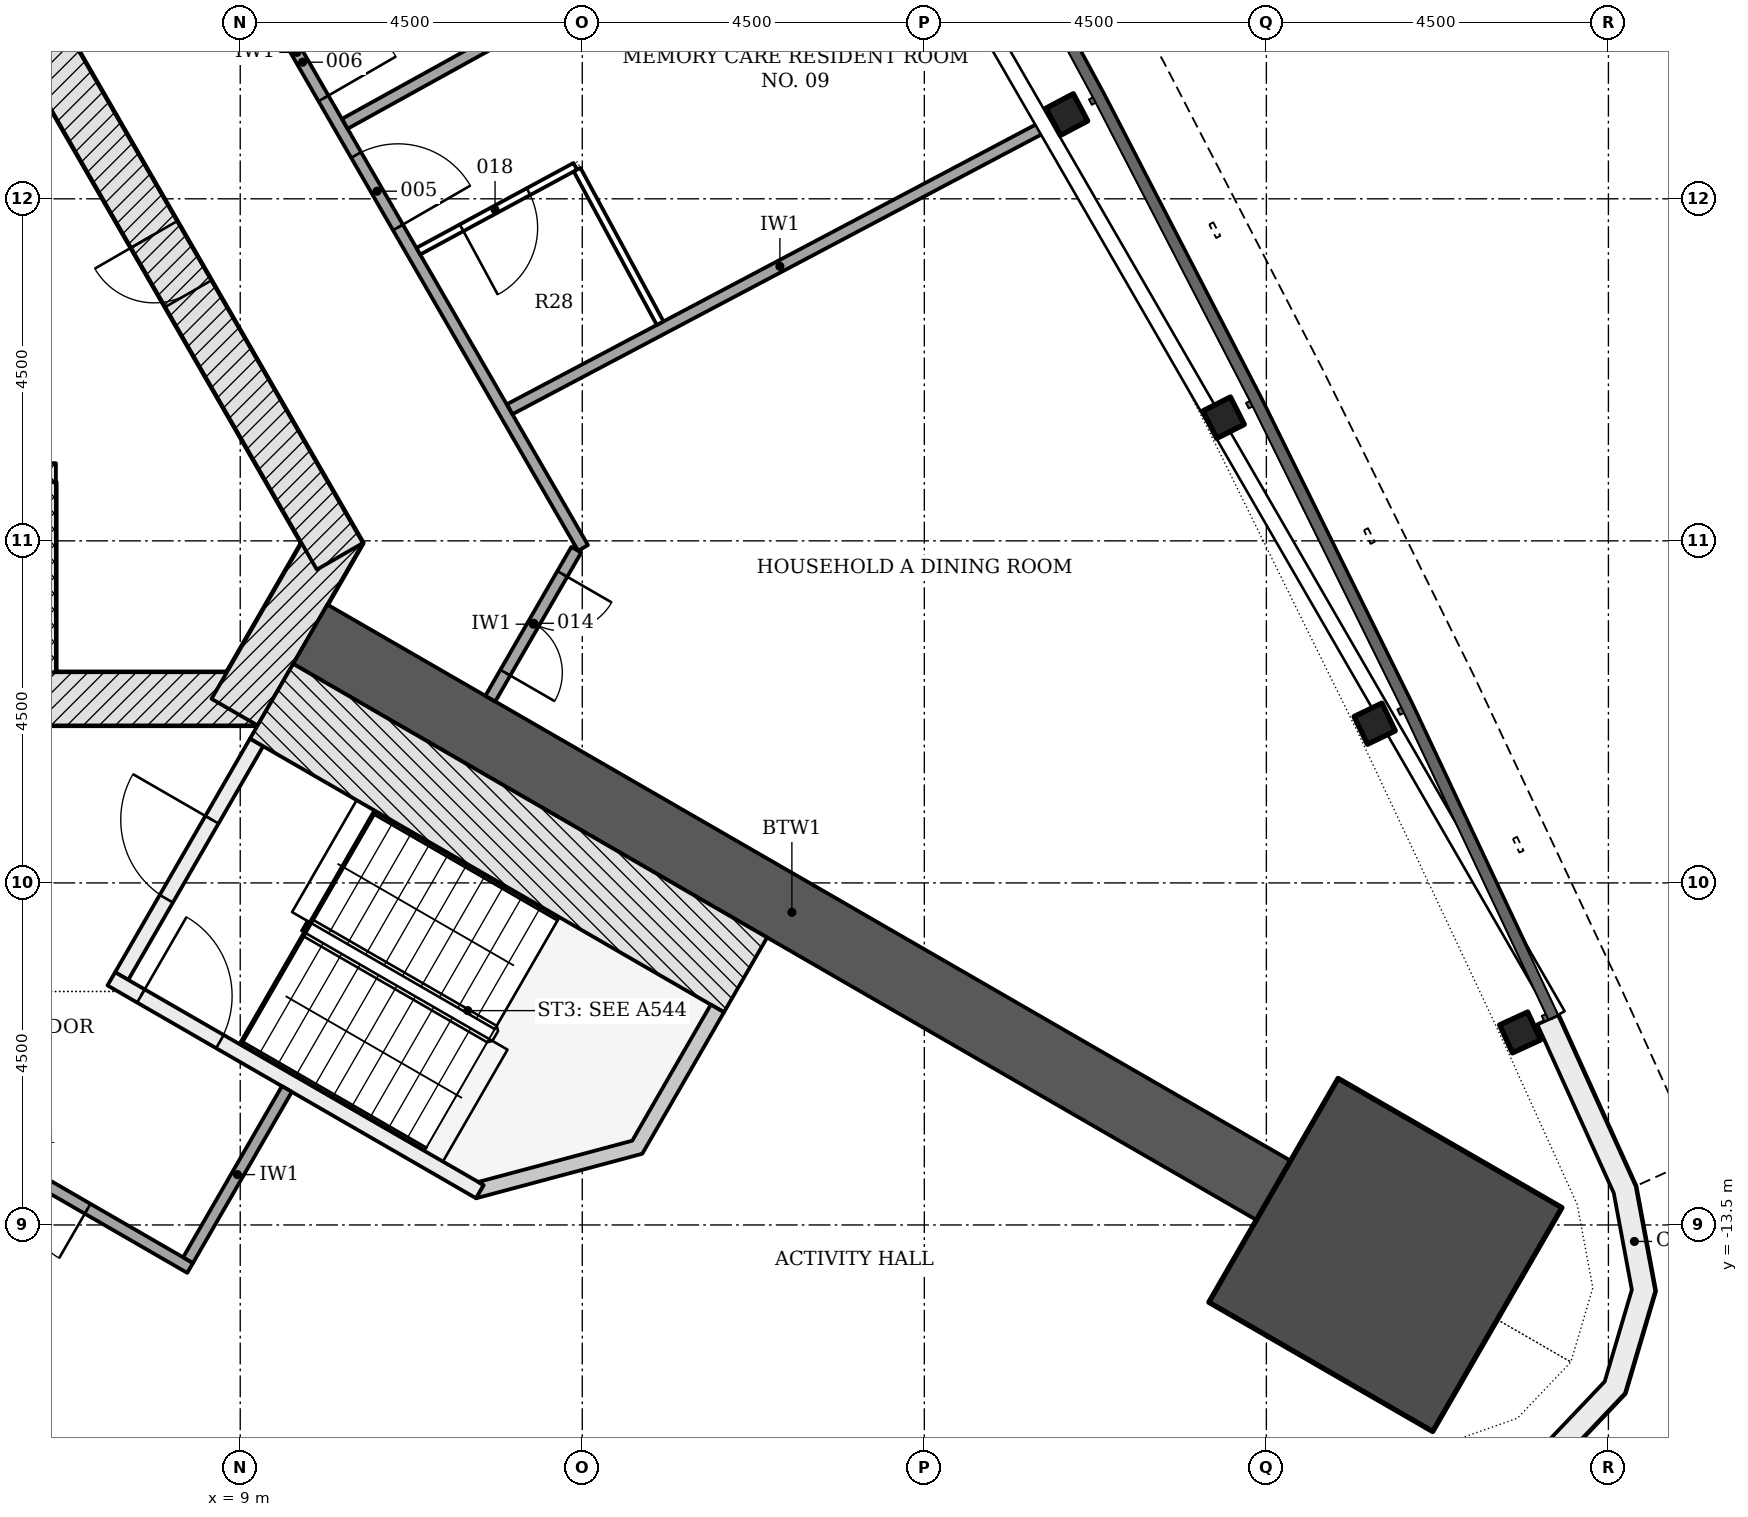
"""IFC4 building model, lengths in metres.
Left out: names, types, materials, properties, quantities, classifications, styles, units other than length and angle.
Written with IfcOpenShell. Run it as: python <this file> out.ifc"""

import sys

from ifc_helpers import new_model, si_unit, direction, frame, frame_2d, origin, origin_2d, place, context, subcontext, project, spatial, polyline, rectangle, i_section, outline, extrude, element, fill, save


model = new_model("IFC4")
c1 = context("Model", 3, precision=1e-05, world=origin(), true_north=direction((0.0, 1.0)))
c2 = subcontext(c1, "Body", "Model", "MODEL_VIEW")
j1 = project(units=[si_unit("LENGTHUNIT", "METRE"), si_unit("PLANEANGLEUNIT", "RADIAN")], contexts=[c1])
p1 = place(None, origin())
s1 = spatial("IfcSite", under=j1, at=p1, CompositionType="ELEMENT")
p2 = place(p1, origin())
s2 = spatial("IfcBuilding", under=s1, at=p2, CompositionType="ELEMENT")
p3 = place(p2, frame((0.0, 0.0, 27.6)))
s3 = spatial("IfcBuildingStorey", under=s2, at=p3, CompositionType="ELEMENT", Elevation=27.6)
p4 = place(p3, frame((-9.229, -6.578, -0.2), z_axis=(0.0, 0.0, 1.0), x_axis=(1.0, 0.0, 0.0)))
e1 = element("IfcWall", 1, at=p4, inside=s3, PredefinedType="SHEAR", context=c2, shape_type="SweptSolid", body=[
    extrude(rectangle(XDim=18.458, YDim=0.7, at=frame_2d((9.229, 0.0))), origin(), (0.0, 0.0, 1.0), 3.6),
])
p5 = place(p4, frame((3.304, 0.0, 0.2)))
e2 = element("IfcOpeningElement", 2, at=p5, cuts=e1, PredefinedType="OPENING", context=c2, shape_type="SweptSolid", body=[
    extrude(rectangle(XDim=1.1, YDim=2.1, at=frame_2d((0.55, 1.05))), frame((0.0, 0.36, 0.0), z_axis=(0.0, -1.0, 0.0), x_axis=(1.0, 0.0, 0.0)), (0.0, 0.0, 1.0), 0.72),
])
p6 = place(p4, frame((5.454, 0.0, 0.2)))
e3 = element("IfcOpeningElement", 3, at=p6, cuts=e1, PredefinedType="OPENING", context=c2, shape_type="SweptSolid", body=[
    extrude(rectangle(XDim=1.1, YDim=2.1, at=frame_2d((0.55, 1.05))), frame((0.0, 0.36, 0.0), z_axis=(0.0, -1.0, 0.0), x_axis=(1.0, 0.0, 0.0)), (0.0, 0.0, 1.0), 0.72),
])
p7 = place(p4, frame((7.604, 0.0, 0.2)))
e4 = element("IfcOpeningElement", 4, at=p7, cuts=e1, PredefinedType="OPENING", context=c2, shape_type="SweptSolid", body=[
    extrude(rectangle(XDim=1.1, YDim=2.1, at=frame_2d((0.55, 1.05))), frame((0.0, 0.36, 0.0), z_axis=(0.0, -1.0, 0.0), x_axis=(1.0, 0.0, 0.0)), (0.0, 0.0, 1.0), 0.72),
])
p8 = place(p4, frame((9.754, 0.0, 0.2)))
e5 = element("IfcOpeningElement", 5, at=p8, cuts=e1, PredefinedType="OPENING", context=c2, shape_type="SweptSolid", body=[
    extrude(rectangle(XDim=1.1, YDim=2.1, at=frame_2d((0.55, 1.05))), frame((0.0, 0.36, 0.0), z_axis=(0.0, -1.0, 0.0), x_axis=(1.0, 0.0, 0.0)), (0.0, 0.0, 1.0), 0.72),
])
p9 = place(p4, frame((11.904, 0.0, 0.2)))
e6 = element("IfcOpeningElement", 6, at=p9, cuts=e1, PredefinedType="OPENING", context=c2, shape_type="SweptSolid", body=[
    extrude(rectangle(XDim=1.1, YDim=2.1, at=frame_2d((0.55, 1.05))), frame((0.0, 0.36, 0.0), z_axis=(0.0, -1.0, 0.0), x_axis=(1.0, 0.0, 0.0)), (0.0, 0.0, 1.0), 0.72),
])
p10 = place(p4, frame((14.054, 0.0, 0.2)))
e7 = element("IfcOpeningElement", 7, at=p10, cuts=e1, PredefinedType="OPENING", context=c2, shape_type="SweptSolid", body=[
    extrude(rectangle(XDim=1.1, YDim=2.1, at=frame_2d((0.55, 1.05))), frame((0.0, 0.36, 0.0), z_axis=(0.0, -1.0, 0.0), x_axis=(1.0, 0.0, 0.0)), (0.0, 0.0, 1.0), 0.72),
])
p11 = place(p4, frame((1.079, 0.0, 0.2)))
e8 = element("IfcOpeningElement", 8, at=p11, cuts=e1, PredefinedType="OPENING", context=c2, shape_type="SweptSolid", body=[
    extrude(rectangle(XDim=0.9, YDim=2.1, at=frame_2d((0.45, 1.05))), frame((0.0, 0.36, 0.0), z_axis=(0.0, -1.0, 0.0), x_axis=(1.0, 0.0, 0.0)), (0.0, 0.0, 1.0), 0.72),
])
p12 = place(p3, frame((8.926, -6.753, -0.2), z_axis=(0.0, 0.0, 1.0), x_axis=(0.500042739161, 0.866000726912, 0.0)))
e9 = element("IfcWall", 9, at=p12, inside=s3, PredefinedType="SHEAR", context=c2, shape_type="SweptSolid", body=[
    extrude(rectangle(XDim=2.771, YDim=0.7, at=frame_2d((1.386, 0.0))), origin(), (0.0, 0.0, 1.0), 3.6),
])
p13 = place(p3, frame((10.311, -4.703, -0.2), z_axis=(0.0, 0.0, 1.0), x_axis=(-0.500001446645, 0.866024568562, 0.0)))
e10 = element("IfcWall", 10, at=p13, inside=s3, PredefinedType="SHEAR", context=c2, shape_type="SweptSolid", body=[
    extrude(rectangle(XDim=18.458, YDim=0.7, at=frame_2d((9.229, 0.0))), origin(), (0.0, 0.0, 1.0), 3.6),
])
p14 = place(p13, frame((8.7, 0.0, 0.2)))
e11 = element("IfcOpeningElement", 11, at=p14, cuts=e10, PredefinedType="OPENING", context=c2, shape_type="SweptSolid", body=[
    extrude(rectangle(XDim=1.0, YDim=2.1, at=frame_2d((0.5, 1.05))), frame((0.0, 0.36, 0.0), z_axis=(0.0, -1.0, 0.0), x_axis=(1.0, 0.0, 0.0)), (0.0, 0.0, 1.0), 0.72),
])
p15 = place(p13, frame((3.99, 0.0, 0.2)))
e12 = element("IfcOpeningElement", 12, at=p15, cuts=e10, PredefinedType="OPENING", context=c2, shape_type="SweptSolid", body=[
    extrude(rectangle(XDim=0.9, YDim=2.1, at=frame_2d((0.45, 1.05))), frame((0.0, 0.36, 0.0), z_axis=(0.0, -1.0, 0.0), x_axis=(1.0, 0.0, 0.0)), (0.0, 0.0, 1.0), 0.72),
])
p16 = place(p13, frame((13.539, 0.0, 0.2)))
e13 = element("IfcOpeningElement", 13, at=p16, cuts=e10, PredefinedType="OPENING", context=c2, shape_type="SweptSolid", body=[
    extrude(rectangle(XDim=0.9, YDim=2.1, at=frame_2d((0.45, 1.05))), frame((0.0, 0.36, 0.0), z_axis=(0.0, -1.0, 0.0), x_axis=(1.0, 0.0, 0.0)), (0.0, 0.0, 1.0), 0.72),
])
p17 = place(p3, frame((9.922, -5.728, -0.2), z_axis=(0.0, 0.0, 1.0), x_axis=(0.866028046028, -0.499995423472, 0.0)))
e14 = element("IfcWall", 14, at=p17, inside=s3, PredefinedType="SHEAR", context=c2, shape_type="SweptSolid", body=[
    extrude(rectangle(XDim=14.633, YDim=0.9, at=frame_2d((7.316, 0.0))), origin(), (0.0, 0.0, 1.0), 3.6),
])
p18 = place(p3, frame((24.066, -13.895, -0.2), z_axis=(0.0, 0.0, 1.0), x_axis=(0.866025403784, -0.5, 0.0)))
e15 = element("IfcColumn", 15, at=p18, inside=s3, PredefinedType="COLUMN", context=c2, shape_type="SweptSolid", body=[
    extrude(rectangle(XDim=3.4, YDim=3.4, at=origin_2d()), origin(), (0.0, 0.0, 1.0), 3.6),
])
for number, where, z_axis, x_axis in (
    (16, (25.838, -10.967, -0.2), (0.0, 0.0, 1.0), (-0.418, 0.909, 0.0)),
    (17, (23.925, -6.905, -0.2), (0.0, 0.0, 1.0), (-0.434, 0.901, 0.0)),
    (18, (21.937, -2.88, -0.2), (0.0, 0.0, 1.0), (-0.451, 0.893, 0.0)),
    (19, (19.875, 1.108, -0.2), (0.0, 0.0, 1.0), (-0.468, 0.884, 0.0)),
):
    element("IfcColumn", number, at=place(p3, frame(where, z_axis=z_axis, x_axis=x_axis)), inside=s3, PredefinedType="COLUMN", context=c2, shape_type="SweptSolid", body=[
        extrude(i_section(OverallWidth=0.404, OverallDepth=0.406, WebThickness=0.027, FlangeThickness=0.044, FilletRadius=0.015, at=origin_2d()), origin(), (0.0, 0.0, 1.0), 3.6),
    ])
p19 = place(p3, origin())
e20 = element("IfcWall", 20, at=p19, inside=s3, PredefinedType="NOTDEFINED", context=c2, shape_type="SweptSolid", body=[
    extrude(outline(polyline([(22.468, -17.44), (24.929, -17.199), (26.252, -16.732), (27.218, -15.715), (27.616, -14.369), (27.359, -12.99), (26.338, -10.738), (26.064, -10.861), (27.071, -13.08), (27.308, -14.353), (26.951, -15.56), (26.084, -16.473), (24.863, -16.904), (22.438, -17.142), (22.468, -17.44)])), origin(), (0.0, 0.0, 1.0), 3.3),
])
p20 = place(p3, frame((6.45, -6.228, -0.2), z_axis=(0.0, 0.0, 1.0), x_axis=(0.0, 1.0, 0.0)))
e21 = element("IfcWall", 21, at=p20, inside=s3, PredefinedType="PARTITIONING", context=c2, shape_type="SweptSolid", body=[
    extrude(rectangle(XDim=2.5, YDim=0.25, at=frame_2d((1.25, 0.0))), origin(), (0.0, 0.0, 1.0), 3.6),
])
p21 = place(p3, frame((-6.575, -3.603, 0.0), z_axis=(0.0, 0.0, 1.0), x_axis=(1.0, 0.0, 0.0)))
e22 = element("IfcWall", 22, at=p21, inside=s3, PredefinedType="PARTITIONING", context=c2, shape_type="SweptSolid", body=[
    extrude(rectangle(XDim=13.15, YDim=0.25, at=frame_2d((6.575, 0.0))), origin(), (0.0, 0.0, 1.0), 3.4),
])
p22 = place(p3, frame((7.44, -10.226, -0.2), z_axis=(0.0, 0.0, 1.0), x_axis=(0.500022077904, 0.866012656725, 0.0)))
e23 = element("IfcWall", 23, at=p22, inside=s3, PredefinedType="SHEAR", context=c2, shape_type="SweptSolid", body=[
    extrude(rectangle(XDim=3.55, YDim=0.2, at=frame_2d((1.775, 0.0))), origin(), (0.0, 0.0, 1.0), 3.6),
])
p23 = place(p22, frame((1.175, 0.0, 0.2)))
e24 = element("IfcOpeningElement", 24, at=p23, cuts=e23, PredefinedType="OPENING", context=c2, shape_type="SweptSolid", body=[
    extrude(rectangle(XDim=1.2, YDim=2.1, at=frame_2d((0.6, 1.05))), frame((0.0, 0.11, 0.0), z_axis=(0.0, -1.0, 0.0), x_axis=(1.0, 0.0, 0.0)), (0.0, 0.0, 1.0), 0.22),
])
p24 = place(p3, frame((7.304, -10.262, -0.2), z_axis=(0.0, 0.0, 1.0), x_axis=(0.866026594901, -0.49999793692, 0.0)))
e25 = element("IfcWall", 25, at=p24, inside=s3, PredefinedType="SHEAR", context=c2, shape_type="SweptSolid", body=[
    extrude(rectangle(XDim=5.6, YDim=0.2, at=frame_2d((2.8, 0.0))), origin(), (0.0, 0.0, 1.0), 3.6),
])
p25 = place(p24, frame((0.45, 0.0, 0.2)))
e26 = element("IfcOpeningElement", 26, at=p25, cuts=e25, PredefinedType="OPENING", context=c2, shape_type="SweptSolid", body=[
    extrude(rectangle(XDim=1.2, YDim=2.1, at=frame_2d((0.6, 1.05))), frame((0.0, 0.11, 0.0), z_axis=(0.0, -1.0, 0.0), x_axis=(1.0, 0.0, 0.0)), (0.0, 0.0, 1.0), 0.22),
])
p26 = place(p3, frame((9.413, -6.61, -0.2), z_axis=(0.0, 0.0, 1.0), x_axis=(0.866018442252, -0.500012057535, 0.0)))
e27 = element("IfcWall", 27, at=p26, inside=s3, PredefinedType="SHEAR", context=c2, shape_type="SweptSolid", body=[
    extrude(rectangle(XDim=7.2, YDim=1.136, at=frame_2d((3.6, 0.0))), origin(), (0.0, 0.0, 1.0), 3.6),
])
p27 = place(p3, frame((0.0, 0.0, -0.2)))
e28 = element("IfcWall", 28, at=p27, inside=s3, PredefinedType="SHEAR", context=c2, shape_type="SweptSolid", body=[
    extrude(outline(polyline([(12.104, -13.149), (14.289, -12.563), (15.364, -10.701), (15.191, -10.601), (14.157, -12.392), (12.132, -12.934), (12.204, -12.976), (12.204, -12.976), (12.204, -12.976), (12.204, -12.976), (12.204, -12.976), (12.204, -12.976), (12.204, -12.976), (12.204, -12.976), (12.204, -12.976), (12.204, -12.976), (12.204, -12.976), (12.204, -12.976), (12.204, -12.976), (12.204, -12.976), (12.204, -12.976), (12.204, -12.976), (12.204, -12.976), (12.104, -13.149)])), origin(), (0.0, 0.0, 1.0), 3.6),
])
p28 = place(p3, frame((5.981, 8.446, 0.0), z_axis=(0.0, 0.0, 1.0), x_axis=(0.499996620721, -0.866027354803, 0.0)))
e29 = element("IfcWall", 29, at=p28, inside=s3, PredefinedType="PARTITIONING", context=c2, shape_type="SweptSolid", body=[
    extrude(rectangle(XDim=15.057, YDim=0.15, at=frame_2d((7.528, 0.0))), origin(), (0.0, 0.0, 1.0), 2.768),
])
p29 = place(p28, frame((9.087, 0.0, 0.0)))
e30 = element("IfcOpeningElement", 30, at=p29, cuts=e29, PredefinedType="OPENING", context=c2, shape_type="SweptSolid", body=[
    extrude(rectangle(XDim=1.1, YDim=2.1, at=frame_2d((0.55, 1.05))), frame((0.0, 0.085, 0.0), z_axis=(0.0, -1.0, 0.0), x_axis=(1.0, 0.0, 0.0)), (0.0, 0.0, 1.0), 0.17),
])
p30 = place(p28, frame((7.128, 0.0, 0.0)))
e31 = element("IfcOpeningElement", 31, at=p30, cuts=e29, PredefinedType="OPENING", context=c2, shape_type="SweptSolid", body=[
    extrude(rectangle(XDim=1.1, YDim=2.1, at=frame_2d((0.55, 1.05))), frame((0.0, 0.085, 0.0), z_axis=(0.0, -1.0, 0.0), x_axis=(1.0, 0.0, 0.0)), (0.0, 0.0, 1.0), 0.17),
])
p31 = place(p3, frame((8.341, -14.066, 0.0), z_axis=(0.0, 0.0, 1.0), x_axis=(-0.866017493347, 0.500013701029, 0.0)))
e32 = element("IfcWall", 32, at=p31, inside=s3, PredefinedType="PARTITIONING", context=c2, shape_type="SweptSolid", body=[
    extrude(rectangle(XDim=5.95, YDim=0.15, at=frame_2d((2.975, 0.0))), origin(), (0.0, 0.0, 1.0), 2.768),
])
p32 = place(p31, frame((1.557, 0.0, 0.0)))
e33 = element("IfcOpeningElement", 33, at=p32, cuts=e32, PredefinedType="OPENING", context=c2, shape_type="SweptSolid", body=[
    extrude(rectangle(XDim=1.5, YDim=2.1, at=frame_2d((0.75, 1.05))), frame((0.0, 0.085, 0.0), z_axis=(0.0, -1.0, 0.0), x_axis=(1.0, 0.0, 0.0)), (0.0, 0.0, 1.0), 0.17),
])
p33 = place(p3, frame((8.314, -13.963, 0.0), z_axis=(0.0, 0.0, 1.0), x_axis=(0.499936506574, 0.866062058628, 0.0)))
e34 = element("IfcWall", 34, at=p33, inside=s3, PredefinedType="PARTITIONING", context=c2, shape_type="SweptSolid", body=[
    extrude(rectangle(XDim=2.6, YDim=0.15, at=frame_2d((1.3, 0.0))), origin(), (0.0, 0.0, 1.0), 2.923),
])
p34 = place(p3, frame((13.421, -4.617, 0.0), z_axis=(0.0, 0.0, 1.0), x_axis=(-0.499946688677, -0.866056180903, 0.0)))
e35 = element("IfcWall", 35, at=p34, inside=s3, PredefinedType="PARTITIONING", context=c2, shape_type="SweptSolid", body=[
    extrude(rectangle(XDim=2.262, YDim=0.15, at=frame_2d((1.131, 0.0))), origin(), (0.0, 0.0, 1.0), 3.4),
])
p35 = place(p34, frame((0.367, 0.0, 0.0)))
e36 = element("IfcOpeningElement", 36, at=p35, cuts=e35, PredefinedType="OPENING", context=c2, shape_type="SweptSolid", body=[
    extrude(rectangle(XDim=1.5, YDim=2.1, at=frame_2d((0.75, 1.05))), frame((0.0, 0.085, 0.0), z_axis=(0.0, -1.0, 0.0), x_axis=(1.0, 0.0, 0.0)), (0.0, 0.0, 1.0), 0.17),
])
p36 = place(p3, frame((17.521, 4.937, 0.0), z_axis=(0.0, 0.0, 1.0), x_axis=(-0.875148563779, -0.483854307944, 0.0)))
e37 = element("IfcWall", 37, at=p36, inside=s3, PredefinedType="PARTITIONING", context=c2, shape_type="SweptSolid", body=[
    extrude(rectangle(XDim=8.164, YDim=0.15, at=frame_2d((4.082, 0.0))), origin(), (0.0, 0.0, 1.0), 2.768),
])
p37 = place(p3, frame((19.654, 0.992, 0.0), z_axis=(0.0, 0.0, 1.0), x_axis=(-0.883980590433, -0.467523599124, 0.0)))
e38 = element("IfcWall", 38, at=p37, inside=s3, PredefinedType="PARTITIONING", context=c2, shape_type="SweptSolid", body=[
    extrude(rectangle(XDim=8.041, YDim=0.15, at=frame_2d((4.021, 0.0))), origin(), (0.0, 0.0, 1.0), 2.768),
])
p38 = place(p3, frame((13.408, 0.427, 0.0), z_axis=(0.0, 0.0, 1.0), x_axis=(-0.879611235398, -0.475693256797, 0.0)))
e39 = element("IfcWall", 39, at=p38, inside=s3, PredefinedType="PARTITIONING", context=c2, shape_type="SweptSolid", body=[
    extrude(rectangle(XDim=2.347, YDim=0.1, at=frame_2d((1.173, 0.0))), origin(), (0.0, 0.0, 1.0), 3.4),
])
p39 = place(p38, frame((0.7, 0.0, 0.0)))
e40 = element("IfcOpeningElement", 40, at=p39, cuts=e39, PredefinedType="OPENING", context=c2, shape_type="SweptSolid", body=[
    extrude(rectangle(XDim=1.0, YDim=2.1, at=frame_2d((0.5, 1.05))), frame((0.0, 0.06, 0.0), z_axis=(0.0, -1.0, 0.0), x_axis=(1.0, 0.0, 0.0)), (0.0, 0.0, 1.0), 0.12),
])
p40 = place(p3, frame((14.524, -1.636, 0.0), z_axis=(0.0, 0.0, 1.0), x_axis=(-0.475734975891, 0.879588672457, 0.0)))
e41 = element("IfcWall", 41, at=p40, inside=s3, PredefinedType="PARTITIONING", context=c2, shape_type="SweptSolid", body=[
    extrude(rectangle(XDim=2.296, YDim=0.1, at=frame_2d((1.148, 0.0))), origin(), (0.0, 0.0, 1.0), 2.768),
])
p41 = place(p15, origin())
e42 = element("IfcDoor", 42, at=p41, inside=s3, OperationType="SINGLE_SWING_RIGHT", PredefinedType="DOOR", context=c2, shape_type="SweptSolid", body=[
    extrude(rectangle(XDim=0.9, YDim=2.1, at=frame_2d((0.45, 1.05))), frame((0.0, 0.075, 0.0), z_axis=(0.0, -1.0, 0.0), x_axis=(1.0, 0.0, 0.0)), (0.0, 0.0, 1.0), 0.15),
])
fill(e12, e42)
p42 = place(p23, origin())
e43 = element("IfcDoor", 43, at=p42, inside=s3, OperationType="SINGLE_SWING_RIGHT", PredefinedType="DOOR", context=c2, shape_type="SweptSolid", body=[
    extrude(rectangle(XDim=1.2, YDim=2.1, at=frame_2d((0.6, 1.05))), frame((0.0, 0.025, 0.0), z_axis=(0.0, -1.0, 0.0), x_axis=(1.0, 0.0, 0.0)), (0.0, 0.0, 1.0), 0.05),
])
fill(e24, e43)
p43 = place(p25, origin())
e44 = element("IfcDoor", 44, at=p43, inside=s3, OperationType="SINGLE_SWING_LEFT", PredefinedType="DOOR", context=c2, shape_type="SweptSolid", body=[
    extrude(rectangle(XDim=1.2, YDim=2.1, at=frame_2d((0.6, 1.05))), frame((0.0, 0.025, 0.0), z_axis=(0.0, -1.0, 0.0), x_axis=(1.0, 0.0, 0.0)), (0.0, 0.0, 1.0), 0.05),
])
fill(e26, e44)
p44 = place(p29, origin())
e45 = element("IfcDoor", 45, at=p44, inside=s3, OperationType="SINGLE_SWING_RIGHT", PredefinedType="DOOR", context=c2, shape_type="SweptSolid", body=[
    extrude(rectangle(XDim=1.1, YDim=2.1, at=frame_2d((0.55, 1.05))), frame((0.0, 0.025, 0.0), z_axis=(0.0, -1.0, 0.0), x_axis=(1.0, 0.0, 0.0)), (0.0, 0.0, 1.0), 0.05),
])
fill(e30, e45)
p45 = place(p30, origin())
e46 = element("IfcDoor", 46, at=p45, inside=s3, OperationType="SINGLE_SWING_RIGHT", PredefinedType="DOOR", context=c2, shape_type="SweptSolid", body=[
    extrude(rectangle(XDim=1.1, YDim=2.1, at=frame_2d((0.55, 1.05))), frame((0.0, 0.025, 0.0), z_axis=(0.0, -1.0, 0.0), x_axis=(1.0, 0.0, 0.0)), (0.0, 0.0, 1.0), 0.05),
])
fill(e31, e46)
p46 = place(p32, origin())
e47 = element("IfcDoor", 47, at=p46, inside=s3, OperationType="DOUBLE_DOOR_SINGLE_SWING", PredefinedType="DOOR", context=c2, shape_type="SweptSolid", body=[
    extrude(rectangle(XDim=1.5, YDim=2.1, at=frame_2d((0.75, 1.05))), frame((0.0, 0.025, 0.0), z_axis=(0.0, -1.0, 0.0), x_axis=(1.0, 0.0, 0.0)), (0.0, 0.0, 1.0), 0.05),
])
fill(e33, e47)
p47 = place(p35, origin())
e48 = element("IfcDoor", 48, at=p47, inside=s3, OperationType="DOUBLE_DOOR_SINGLE_SWING", PredefinedType="DOOR", context=c2, shape_type="SweptSolid", body=[
    extrude(rectangle(XDim=1.5, YDim=2.1, at=frame_2d((0.75, 1.05))), frame((0.0, 0.025, 0.0), z_axis=(0.0, -1.0, 0.0), x_axis=(1.0, 0.0, 0.0)), (0.0, 0.0, 1.0), 0.05),
])
fill(e36, e48)
p48 = place(p39, origin())
e49 = element("IfcDoor", 49, at=p48, inside=s3, OperationType="SINGLE_SWING_RIGHT", PredefinedType="DOOR", context=c2, shape_type="SweptSolid", body=[
    extrude(rectangle(XDim=1.0, YDim=2.1, at=frame_2d((0.5, 1.05))), frame((0.0, 0.025, 0.0), z_axis=(0.0, -1.0, 0.0), x_axis=(1.0, 0.0, 0.0)), (0.0, 0.0, 1.0), 0.05),
])
fill(e40, e49)
save(model, sys.argv[1])
